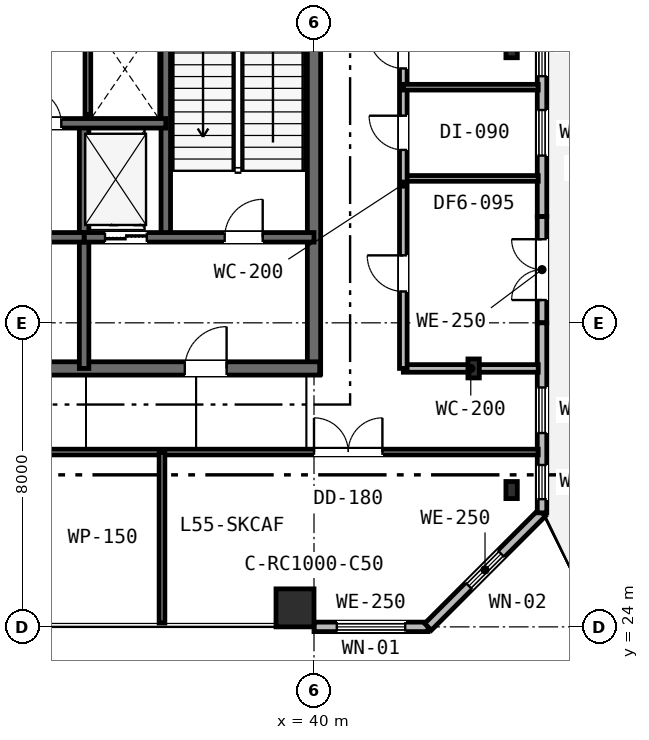
"""IFC4 building model, lengths in metres.
Left out: names, types, materials, properties, quantities, classifications, styles, units other than length and angle.
Written with IfcOpenShell. Run it as: python <this file> out.ifc"""

import sys

from ifc_helpers import new_model, si_unit, direction, frame, frame_2d, origin, origin_2d, place, context, subcontext, project, spatial, rectangle, i_section, extrude, element, fill, save


model = new_model("IFC4")
c1 = context("Model", 3, precision=1e-05, world=origin(), true_north=direction((0.0, 1.0)))
c2 = subcontext(c1, "Body", "Model", "MODEL_VIEW")
j1 = project(units=[si_unit("LENGTHUNIT", "METRE"), si_unit("PLANEANGLEUNIT", "RADIAN")], contexts=[c1])
p1 = place(None, origin())
s1 = spatial("IfcSite", under=j1, at=p1, CompositionType="ELEMENT")
p2 = place(p1, origin())
s2 = spatial("IfcBuilding", under=s1, at=p2, CompositionType="ELEMENT")
p3 = place(p2, frame((0.0, 0.0, 213.0)))
s3 = spatial("IfcBuildingStorey", under=s2, at=p3, CompositionType="ELEMENT", Elevation=213.0)
p4 = place(p3, frame((40.0, 30.65, 0.0), z_axis=(0.0, 0.0, 1.0), x_axis=(0.0, 1.0, 0.0)))
e1 = element("IfcWall", 1, at=p4, inside=s3, PredefinedType="SHEAR", context=c2, shape_type="SweptSolid", body=[
    extrude(rectangle(XDim=12.3, YDim=0.35, at=frame_2d((6.15, 0.0))), origin(), (0.0, 0.0, 1.0), 5.4),
])
p5 = place(p3, frame((28.95, 30.8, 0.0), z_axis=(0.0, 0.0, 1.0), x_axis=(1.0, 0.0, 0.0)))
e2 = element("IfcWall", 2, at=p5, inside=s3, PredefinedType="SHEAR", context=c2, shape_type="SweptSolid", body=[
    extrude(rectangle(XDim=11.2, YDim=0.35, at=frame_2d((5.6, 0.0))), origin(), (0.0, 0.0, 1.0), 5.4),
])
p6 = place(p5, frame((7.65, 0.0, 0.0)))
e3 = element("IfcOpeningElement", 3, at=p6, cuts=e2, PredefinedType="OPENING", context=c2, shape_type="SweptSolid", body=[
    extrude(rectangle(XDim=1.1, YDim=2.15, at=frame_2d((0.55, 1.075))), frame((0.0, 0.185, 0.0), z_axis=(0.0, -1.0, 0.0), x_axis=(1.0, 0.0, 0.0)), (0.0, 0.0, 1.0), 0.37),
])
p7 = place(p3, frame((36.1, 34.25, 0.0), z_axis=(0.0, 0.0, 1.0), x_axis=(0.0, 1.0, 0.0)))
e4 = element("IfcWall", 4, at=p7, inside=s3, PredefinedType="SHEAR", context=c2, shape_type="SweptSolid", body=[
    extrude(rectangle(XDim=8.65, YDim=0.25, at=frame_2d((4.325, 0.0))), origin(), (0.0, 0.0, 1.0), 5.4),
])
p8 = place(p3, frame((33.95, 30.8, 0.0), z_axis=(0.0, 0.0, 1.0), x_axis=(0.0, 1.0, 0.0)))
e5 = element("IfcWall", 5, at=p8, inside=s3, PredefinedType="SHEAR", context=c2, shape_type="SweptSolid", body=[
    extrude(rectangle(XDim=6.45, YDim=0.25, at=frame_2d((3.225, 0.0))), origin(), (0.0, 0.0, 1.0), 5.4),
])
p9 = place(p3, frame((33.95, 34.25, 0.0), z_axis=(0.0, 0.0, 1.0), x_axis=(1.0, 0.0, 0.0)))
e6 = element("IfcWall", 6, at=p9, inside=s3, PredefinedType="SHEAR", context=c2, shape_type="SweptSolid", body=[
    extrude(rectangle(XDim=6.05, YDim=0.25, at=frame_2d((3.025, 0.0))), origin(), (0.0, 0.0, 1.0), 5.4),
])
p10 = place(p9, frame((3.7, 0.0, 0.0)))
e7 = element("IfcOpeningElement", 7, at=p10, cuts=e6, PredefinedType="OPENING", context=c2, shape_type="SweptSolid", body=[
    extrude(rectangle(XDim=1.0, YDim=2.15, at=frame_2d((0.5, 1.075))), frame((0.0, 0.135, 0.0), z_axis=(0.0, -1.0, 0.0), x_axis=(1.0, 0.0, 0.0)), (0.0, 0.0, 1.0), 0.27),
])
p11 = place(p9, frame((0.55, 0.0, 0.0)))
e8 = element("IfcOpeningElement", 8, at=p11, cuts=e6, PredefinedType="OPENING", context=c2, shape_type="SweptSolid", body=[
    extrude(rectangle(XDim=1.1, YDim=2.15, at=frame_2d((0.55, 1.075))), frame((0.0, 0.135, 0.0), z_axis=(0.0, -1.0, 0.0), x_axis=(1.0, 0.0, 0.0)), (0.0, 0.0, 1.0), 0.27),
])
p12 = place(p3, frame((28.95, 34.25, 0.0), z_axis=(0.0, 0.0, 1.0), x_axis=(1.0, 0.0, 0.0)))
e9 = element("IfcWall", 9, at=p12, inside=s3, PredefinedType="SHEAR", context=c2, shape_type="SweptSolid", body=[
    extrude(rectangle(XDim=5.0, YDim=0.25, at=frame_2d((2.5, 0.0))), origin(), (0.0, 0.0, 1.0), 5.4),
])
p13 = place(p12, frame((1.95, 0.0, 0.0)))
e10 = element("IfcOpeningElement", 10, at=p13, cuts=e9, PredefinedType="OPENING", context=c2, shape_type="SweptSolid", body=[
    extrude(rectangle(XDim=1.0, YDim=2.15, at=frame_2d((0.5, 1.075))), frame((0.0, 0.135, 0.0), z_axis=(0.0, -1.0, 0.0), x_axis=(1.0, 0.0, 0.0)), (0.0, 0.0, 1.0), 0.27),
])
p14 = place(p3, frame((19.9, 37.25, 0.0), z_axis=(0.0, 0.0, 1.0), x_axis=(1.0, 0.0, 0.0)))
e11 = element("IfcWall", 11, at=p14, inside=s3, PredefinedType="SHEAR", context=c2, shape_type="SweptSolid", body=[
    extrude(rectangle(XDim=16.2, YDim=0.25, at=frame_2d((8.1, 0.0))), origin(), (0.0, 0.0, 1.0), 5.4),
])
p15 = place(p14, frame((12.55, 0.0, 0.0)))
e12 = element("IfcOpeningElement", 12, at=p15, cuts=e11, PredefinedType="OPENING", context=c2, shape_type="SweptSolid", body=[
    extrude(rectangle(XDim=0.9, YDim=2.15, at=frame_2d((0.45, 1.075))), frame((0.0, 0.135, 0.0), z_axis=(0.0, -1.0, 0.0), x_axis=(1.0, 0.0, 0.0)), (0.0, 0.0, 1.0), 0.27),
])
p16 = place(p14, frame((2.5, 0.0, 0.0)))
e13 = element("IfcOpeningElement", 13, at=p16, cuts=e11, PredefinedType="OPENING", context=c2, shape_type="SweptSolid", body=[
    extrude(rectangle(XDim=1.05, YDim=2.15, at=frame_2d((0.525, 1.075))), frame((0.0, 0.135, 0.0), z_axis=(0.0, -1.0, 0.0), x_axis=(1.0, 0.0, 0.0)), (0.0, 0.0, 1.0), 0.27),
])
p17 = place(p14, frame((4.4, 0.0, 0.0)))
e14 = element("IfcOpeningElement", 14, at=p17, cuts=e11, PredefinedType="OPENING", context=c2, shape_type="SweptSolid", body=[
    extrude(rectangle(XDim=1.05, YDim=2.15, at=frame_2d((0.525, 1.075))), frame((0.0, 0.135, 0.0), z_axis=(0.0, -1.0, 0.0), x_axis=(1.0, 0.0, 0.0)), (0.0, 0.0, 1.0), 0.27),
])
p18 = place(p14, frame((6.3, 0.0, 0.0)))
e15 = element("IfcOpeningElement", 15, at=p18, cuts=e11, PredefinedType="OPENING", context=c2, shape_type="SweptSolid", body=[
    extrude(rectangle(XDim=1.05, YDim=2.15, at=frame_2d((0.525, 1.075))), frame((0.0, 0.135, 0.0), z_axis=(0.0, -1.0, 0.0), x_axis=(1.0, 0.0, 0.0)), (0.0, 0.0, 1.0), 0.27),
])
p19 = place(p3, frame((39.5, 24.5, 0.0), z_axis=(0.0, 0.0, 1.0), x_axis=(1.0, 0.0, 0.0)))
e16 = element("IfcColumn", 16, at=p19, inside=s3, PredefinedType="COLUMN", context=c2, shape_type="SweptSolid", body=[
    extrude(rectangle(XDim=1.0, YDim=1.0, at=origin_2d()), origin(), (0.0, 0.0, 1.0), 5.4),
])
for number, where, z_axis, x_axis in (
    (17, (45.2, 27.6, 0.0), (0.0, 0.0, 1.0), (1.0, 0.0, 0.0)),
    (18, (45.2, 39.2, 0.0), (0.0, 0.0, 1.0), (1.0, 0.0, 0.0)),
):
    element("IfcColumn", number, at=place(p3, frame(where, z_axis=z_axis, x_axis=x_axis)), inside=s3, PredefinedType="COLUMN", context=c2, shape_type="SweptSolid", body=[
        extrude(i_section(OverallWidth=0.3, OverallDepth=0.45, WebThickness=0.014, FlangeThickness=0.026, FilletRadius=0.027, at=origin_2d()), origin(), (0.0, 0.0, 1.0), 5.4),
    ])
p20 = place(p3, frame((44.2, 30.8, 0.0), z_axis=(0.0, 0.0, 1.0), x_axis=(1.0, 0.0, 0.0)))
e19 = element("IfcColumn", 19, at=p20, inside=s3, PredefinedType="COLUMN", context=c2, shape_type="SweptSolid", body=[
    extrude(i_section(OverallWidth=0.3, OverallDepth=0.5, WebThickness=0.015, FlangeThickness=0.028, FilletRadius=0.027, at=origin_2d()), origin(), (0.0, 0.0, 1.0), 5.4),
])
p21 = place(p3, frame((40.0, 24.0, 0.0), z_axis=(0.0, 0.0, 1.0), x_axis=(1.0, 0.0, 0.0)))
e20 = element("IfcWall", 20, at=p21, inside=s3, PredefinedType="STANDARD", context=c2, shape_type="SweptSolid", body=[
    extrude(rectangle(XDim=3.0, YDim=0.25, at=frame_2d((1.5, 0.0))), origin(), (0.0, 0.0, 1.0), 5.13),
])
p22 = place(p21, frame((0.6, 0.0, 0.75)))
e21 = element("IfcOpeningElement", 21, at=p22, cuts=e20, PredefinedType="OPENING", context=c2, shape_type="SweptSolid", body=[
    extrude(rectangle(XDim=1.8, YDim=1.85, at=frame_2d((0.9, 0.925))), frame((0.0, 0.135, 0.0), z_axis=(0.0, -1.0, 0.0), x_axis=(1.0, 0.0, 0.0)), (0.0, 0.0, 1.0), 0.27),
])
p23 = place(p3, frame((43.0, 24.0, 0.0), z_axis=(0.0, 0.0, 1.0), x_axis=(0.707106781187, 0.707106781187, 0.0)))
e22 = element("IfcWall", 22, at=p23, inside=s3, PredefinedType="STANDARD", context=c2, shape_type="SweptSolid", body=[
    extrude(rectangle(XDim=4.243, YDim=0.25, at=frame_2d((2.121, 0.0))), origin(), (0.0, 0.0, 1.0), 5.13),
])
p24 = place(p23, frame((1.521, 0.0, 0.85)))
e23 = element("IfcOpeningElement", 23, at=p24, cuts=e22, PredefinedType="OPENING", context=c2, shape_type="SweptSolid", body=[
    extrude(rectangle(XDim=1.2, YDim=1.6, at=frame_2d((0.6, 0.8))), frame((0.0, 0.135, 0.0), z_axis=(0.0, -1.0, 0.0), x_axis=(1.0, 0.0, 0.0)), (0.0, 0.0, 1.0), 0.27),
])
p25 = place(p3, frame((46.0, 32.0, 0.0), z_axis=(0.0, 0.0, 1.0), x_axis=(0.0, 1.0, 0.0)))
e24 = element("IfcWall", 24, at=p25, inside=s3, PredefinedType="STANDARD", context=c2, shape_type="SweptSolid", body=[
    extrude(rectangle(XDim=2.8, YDim=0.25, at=frame_2d((1.4, 0.0))), origin(), (0.0, 0.0, 1.0), 5.13),
])
p26 = place(p25, frame((0.6, 0.0, 0.0)))
e25 = element("IfcOpeningElement", 25, at=p26, cuts=e24, PredefinedType="OPENING", context=c2, shape_type="SweptSolid", body=[
    extrude(rectangle(XDim=1.6, YDim=2.2, at=frame_2d((0.8, 1.1))), frame((0.0, 0.135, 0.0), z_axis=(0.0, -1.0, 0.0), x_axis=(1.0, 0.0, 0.0)), (0.0, 0.0, 1.0), 0.27),
])
p27 = place(p3, frame((46.0, 27.0, 0.0), z_axis=(0.0, 0.0, 1.0), x_axis=(0.0, 1.0, 0.0)))
e26 = element("IfcWall", 26, at=p27, inside=s3, PredefinedType="STANDARD", context=c2, shape_type="SweptSolid", body=[
    extrude(rectangle(XDim=5.0, YDim=0.25, at=frame_2d((2.5, 0.0))), origin(), (0.0, 0.0, 1.0), 5.13),
])
p28 = place(p27, frame((0.36, 0.0, 0.9)))
e27 = element("IfcOpeningElement", 27, at=p28, cuts=e26, PredefinedType="OPENING", context=c2, shape_type="SweptSolid", body=[
    extrude(rectangle(XDim=0.9, YDim=1.55, at=frame_2d((0.45, 0.775))), frame((0.0, 0.135, 0.0), z_axis=(0.0, -1.0, 0.0), x_axis=(1.0, 0.0, 0.0)), (0.0, 0.0, 1.0), 0.27),
])
p29 = place(p27, frame((2.1, 0.0, 0.85)))
e28 = element("IfcOpeningElement", 28, at=p29, cuts=e26, PredefinedType="OPENING", context=c2, shape_type="SweptSolid", body=[
    extrude(rectangle(XDim=1.2, YDim=1.6, at=frame_2d((0.6, 0.8))), frame((0.0, 0.135, 0.0), z_axis=(0.0, -1.0, 0.0), x_axis=(1.0, 0.0, 0.0)), (0.0, 0.0, 1.0), 0.27),
])
p30 = place(p3, frame((46.0, 34.8, 0.0), z_axis=(0.0, 0.0, 1.0), x_axis=(0.0, 1.0, 0.0)))
e29 = element("IfcWall", 29, at=p30, inside=s3, PredefinedType="STANDARD", context=c2, shape_type="SweptSolid", body=[
    extrude(rectangle(XDim=5.2, YDim=0.25, at=frame_2d((2.6, 0.0))), origin(), (0.0, 0.0, 1.0), 5.13),
])
p31 = place(p30, frame((1.6, 0.0, 0.85)))
e30 = element("IfcOpeningElement", 30, at=p31, cuts=e29, PredefinedType="OPENING", context=c2, shape_type="SweptSolid", body=[
    extrude(rectangle(XDim=1.2, YDim=1.6, at=frame_2d((0.6, 0.8))), frame((0.0, 0.135, 0.0), z_axis=(0.0, -1.0, 0.0), x_axis=(1.0, 0.0, 0.0)), (0.0, 0.0, 1.0), 0.27),
])
p32 = place(p30, frame((3.69, 0.0, 0.85)))
e31 = element("IfcOpeningElement", 31, at=p32, cuts=e29, PredefinedType="OPENING", context=c2, shape_type="SweptSolid", body=[
    extrude(rectangle(XDim=1.2, YDim=1.6, at=frame_2d((0.6, 0.8))), frame((0.0, 0.135, 0.0), z_axis=(0.0, -1.0, 0.0), x_axis=(1.0, 0.0, 0.0)), (0.0, 0.0, 1.0), 0.27),
])
p33 = place(p3, frame((34.05, 37.473, 0.0), z_axis=(0.0, 0.0, 1.0), x_axis=(0.0, 1.0, 0.0)))
e32 = element("IfcWall", 32, at=p33, inside=s3, PredefinedType="PLUMBINGWALL", context=c2, shape_type="SweptSolid", body=[
    extrude(rectangle(XDim=2.577, YDim=0.15, at=frame_2d((1.288, 0.0))), origin(), (0.0, 0.0, 1.0), 5.13),
])
p34 = place(p3, frame((42.35, 30.8, 0.0), z_axis=(0.0, 0.0, 1.0), x_axis=(1.0, 0.0, 0.0)))
e33 = element("IfcWall", 33, at=p34, inside=s3, PredefinedType="PARTITIONING", context=c2, shape_type="SweptSolid", body=[
    extrude(rectangle(XDim=3.55, YDim=0.2, at=frame_2d((1.775, 0.0))), origin(), (0.0, 0.0, 1.0), 4.52),
])
p35 = place(p3, frame((42.35, 35.8, 0.0), z_axis=(0.0, 0.0, 1.0), x_axis=(1.0, 0.0, 0.0)))
e34 = element("IfcWall", 34, at=p35, inside=s3, PredefinedType="PARTITIONING", context=c2, shape_type="SweptSolid", body=[
    extrude(rectangle(XDim=3.55, YDim=0.15, at=frame_2d((1.775, 0.0))), origin(), (0.0, 0.0, 1.0), 4.52),
])
p36 = place(p3, frame((42.35, 30.8, 0.0), z_axis=(0.0, 0.0, 1.0), x_axis=(0.0, 1.0, 0.0)))
e35 = element("IfcWall", 35, at=p36, inside=s3, PredefinedType="PARTITIONING", context=c2, shape_type="SweptSolid", body=[
    extrude(rectangle(XDim=9.7, YDim=0.2, at=frame_2d((4.85, 0.0))), origin(), (0.0, 0.0, 1.0), 4.52),
])
p37 = place(p36, frame((2.025, 0.0, 0.0)))
e36 = element("IfcOpeningElement", 36, at=p37, cuts=e35, PredefinedType="OPENING", context=c2, shape_type="SweptSolid", body=[
    extrude(rectangle(XDim=0.95, YDim=2.15, at=frame_2d((0.475, 1.075))), frame((0.0, 0.11, 0.0), z_axis=(0.0, -1.0, 0.0), x_axis=(1.0, 0.0, 0.0)), (0.0, 0.0, 1.0), 0.22),
])
p38 = place(p36, frame((5.75, 0.0, 0.0)))
e37 = element("IfcOpeningElement", 37, at=p38, cuts=e35, PredefinedType="OPENING", context=c2, shape_type="SweptSolid", body=[
    extrude(rectangle(XDim=0.9, YDim=2.15, at=frame_2d((0.45, 1.075))), frame((0.0, 0.11, 0.0), z_axis=(0.0, -1.0, 0.0), x_axis=(1.0, 0.0, 0.0)), (0.0, 0.0, 1.0), 0.22),
])
p39 = place(p36, frame((7.893, 0.0, 0.0)))
e38 = element("IfcOpeningElement", 38, at=p39, cuts=e35, PredefinedType="OPENING", context=c2, shape_type="SweptSolid", body=[
    extrude(rectangle(XDim=0.9, YDim=2.15, at=frame_2d((0.45, 1.075))), frame((0.0, 0.11, 0.0), z_axis=(0.0, -1.0, 0.0), x_axis=(1.0, 0.0, 0.0)), (0.0, 0.0, 1.0), 0.22),
])
p40 = place(p3, frame((42.35, 38.2, 0.0), z_axis=(0.0, 0.0, 1.0), x_axis=(1.0, 0.0, 0.0)))
e39 = element("IfcWall", 39, at=p40, inside=s3, PredefinedType="PARTITIONING", context=c2, shape_type="SweptSolid", body=[
    extrude(rectangle(XDim=3.55, YDim=0.15, at=frame_2d((1.775, 0.0))), origin(), (0.0, 0.0, 1.0), 4.52),
])
p41 = place(p3, frame((13.7, 28.6, 0.0), z_axis=(0.0, 0.0, 1.0), x_axis=(1.0, 0.0, 0.0)))
e40 = element("IfcWall", 40, at=p41, inside=s3, PredefinedType="PARTITIONING", context=c2, shape_type="SweptSolid", body=[
    extrude(rectangle(XDim=32.2, YDim=0.15, at=frame_2d((16.1, 0.0))), origin(), (0.0, 0.0, 1.0), 4.52),
])
p42 = place(p41, frame((15.4, 0.0, 0.0)))
e41 = element("IfcOpeningElement", 41, at=p42, cuts=e40, PredefinedType="OPENING", context=c2, shape_type="SweptSolid", body=[
    extrude(rectangle(XDim=1.8, YDim=2.15, at=frame_2d((0.9, 1.075))), frame((0.0, 0.085, 0.0), z_axis=(0.0, -1.0, 0.0), x_axis=(1.0, 0.0, 0.0)), (0.0, 0.0, 1.0), 0.17),
])
p43 = place(p41, frame((26.3, 0.0, 0.0)))
e42 = element("IfcOpeningElement", 42, at=p43, cuts=e40, PredefinedType="OPENING", context=c2, shape_type="SweptSolid", body=[
    extrude(rectangle(XDim=1.8, YDim=2.15, at=frame_2d((0.9, 1.075))), frame((0.0, 0.085, 0.0), z_axis=(0.0, -1.0, 0.0), x_axis=(1.0, 0.0, 0.0)), (0.0, 0.0, 1.0), 0.17),
])
p44 = place(p3, frame((36.0, 24.1, 0.0), z_axis=(0.0, 0.0, 1.0), x_axis=(0.0, 1.0, 0.0)))
e43 = element("IfcWall", 43, at=p44, inside=s3, PredefinedType="PARTITIONING", context=c2, shape_type="SweptSolid", body=[
    extrude(rectangle(XDim=4.5, YDim=0.15, at=frame_2d((2.25, 0.0))), origin(), (0.0, 0.0, 1.0), 4.84),
])
p45 = place(p22, origin())
e44 = element("IfcWindow", 44, at=p45, inside=s3, PartitioningType="SINGLE_PANEL", PredefinedType="WINDOW", context=c2, shape_type="SweptSolid", body=[
    extrude(rectangle(XDim=1.8, YDim=1.85, at=frame_2d((0.9, 0.925))), frame((0.0, 0.03, 0.0), z_axis=(0.0, -1.0, 0.0), x_axis=(1.0, 0.0, 0.0)), (0.0, 0.0, 1.0), 0.06),
])
fill(e21, e44)
p46 = place(p24, origin())
e45 = element("IfcWindow", 45, at=p46, inside=s3, PartitioningType="SINGLE_PANEL", PredefinedType="WINDOW", context=c2, shape_type="SweptSolid", body=[
    extrude(rectangle(XDim=1.2, YDim=1.6, at=frame_2d((0.6, 0.8))), frame((0.0, 0.03, 0.0), z_axis=(0.0, -1.0, 0.0), x_axis=(1.0, 0.0, 0.0)), (0.0, 0.0, 1.0), 0.06),
])
fill(e23, e45)
p47 = place(p26, origin())
e46 = element("IfcDoor", 46, at=p47, inside=s3, OperationType="DOUBLE_DOOR_SINGLE_SWING", PredefinedType="DOOR", context=c2, shape_type="SweptSolid", body=[
    extrude(rectangle(XDim=1.6, YDim=2.2, at=frame_2d((0.8, 1.1))), frame((0.0, 0.025, 0.0), z_axis=(0.0, -1.0, 0.0), x_axis=(1.0, 0.0, 0.0)), (0.0, 0.0, 1.0), 0.05),
])
fill(e25, e46)
p48 = place(p28, origin())
e47 = element("IfcWindow", 47, at=p48, inside=s3, PartitioningType="SINGLE_PANEL", PredefinedType="WINDOW", context=c2, shape_type="SweptSolid", body=[
    extrude(rectangle(XDim=0.9, YDim=1.55, at=frame_2d((0.45, 0.775))), frame((0.0, 0.03, 0.0), z_axis=(0.0, -1.0, 0.0), x_axis=(1.0, 0.0, 0.0)), (0.0, 0.0, 1.0), 0.06),
])
fill(e27, e47)
p49 = place(p29, origin())
e48 = element("IfcWindow", 48, at=p49, inside=s3, PartitioningType="SINGLE_PANEL", PredefinedType="WINDOW", context=c2, shape_type="SweptSolid", body=[
    extrude(rectangle(XDim=1.2, YDim=1.6, at=frame_2d((0.6, 0.8))), frame((0.0, 0.03, 0.0), z_axis=(0.0, -1.0, 0.0), x_axis=(1.0, 0.0, 0.0)), (0.0, 0.0, 1.0), 0.06),
])
fill(e28, e48)
p50 = place(p31, origin())
e49 = element("IfcWindow", 49, at=p50, inside=s3, PartitioningType="SINGLE_PANEL", PredefinedType="WINDOW", context=c2, shape_type="SweptSolid", body=[
    extrude(rectangle(XDim=1.2, YDim=1.6, at=frame_2d((0.6, 0.8))), frame((0.0, 0.03, 0.0), z_axis=(0.0, -1.0, 0.0), x_axis=(1.0, 0.0, 0.0)), (0.0, 0.0, 1.0), 0.06),
])
fill(e30, e49)
p51 = place(p32, origin())
e50 = element("IfcWindow", 50, at=p51, inside=s3, PartitioningType="SINGLE_PANEL", PredefinedType="WINDOW", context=c2, shape_type="SweptSolid", body=[
    extrude(rectangle(XDim=1.2, YDim=1.6, at=frame_2d((0.6, 0.8))), frame((0.0, 0.03, 0.0), z_axis=(0.0, -1.0, 0.0), x_axis=(1.0, 0.0, 0.0)), (0.0, 0.0, 1.0), 0.06),
])
fill(e31, e50)
p52 = place(p10, origin())
e51 = element("IfcDoor", 51, at=p52, inside=s3, OperationType="SINGLE_SWING_RIGHT", PredefinedType="DOOR", context=c2, shape_type="SweptSolid", body=[
    extrude(rectangle(XDim=1.0, YDim=2.15, at=frame_2d((0.5, 1.075))), frame((0.0, 0.025, 0.0), z_axis=(0.0, -1.0, 0.0), x_axis=(1.0, 0.0, 0.0)), (0.0, 0.0, 1.0), 0.05),
])
fill(e7, e51)
p53 = place(p6, origin())
e52 = element("IfcDoor", 52, at=p53, inside=s3, OperationType="SINGLE_SWING_RIGHT", PredefinedType="DOOR", context=c2, shape_type="SweptSolid", body=[
    extrude(rectangle(XDim=1.1, YDim=2.15, at=frame_2d((0.55, 1.075))), frame((0.0, 0.025, 0.0), z_axis=(0.0, -1.0, 0.0), x_axis=(1.0, 0.0, 0.0)), (0.0, 0.0, 1.0), 0.05),
])
fill(e3, e52)
p54 = place(p15, origin())
e53 = element("IfcDoor", 53, at=p54, inside=s3, OperationType="SINGLE_SWING_LEFT", PredefinedType="DOOR", context=c2, shape_type="SweptSolid", body=[
    extrude(rectangle(XDim=0.9, YDim=2.15, at=frame_2d((0.45, 1.075))), frame((0.0, 0.025, 0.0), z_axis=(0.0, -1.0, 0.0), x_axis=(1.0, 0.0, 0.0)), (0.0, 0.0, 1.0), 0.05),
])
fill(e12, e53)
p55 = place(p37, origin())
e54 = element("IfcDoor", 54, at=p55, inside=s3, OperationType="SINGLE_SWING_RIGHT", PredefinedType="DOOR", context=c2, shape_type="SweptSolid", body=[
    extrude(rectangle(XDim=0.95, YDim=2.15, at=frame_2d((0.475, 1.075))), frame((0.0, 0.025, 0.0), z_axis=(0.0, -1.0, 0.0), x_axis=(1.0, 0.0, 0.0)), (0.0, 0.0, 1.0), 0.05),
])
fill(e36, e54)
p56 = place(p38, origin())
e55 = element("IfcDoor", 55, at=p56, inside=s3, OperationType="SINGLE_SWING_RIGHT", PredefinedType="DOOR", context=c2, shape_type="SweptSolid", body=[
    extrude(rectangle(XDim=0.9, YDim=2.15, at=frame_2d((0.45, 1.075))), frame((0.0, 0.025, 0.0), z_axis=(0.0, -1.0, 0.0), x_axis=(1.0, 0.0, 0.0)), (0.0, 0.0, 1.0), 0.05),
])
fill(e37, e55)
p57 = place(p39, origin())
e56 = element("IfcDoor", 56, at=p57, inside=s3, OperationType="SINGLE_SWING_RIGHT", PredefinedType="DOOR", context=c2, shape_type="SweptSolid", body=[
    extrude(rectangle(XDim=0.9, YDim=2.15, at=frame_2d((0.45, 1.075))), frame((0.0, 0.025, 0.0), z_axis=(0.0, -1.0, 0.0), x_axis=(1.0, 0.0, 0.0)), (0.0, 0.0, 1.0), 0.05),
])
fill(e38, e56)
p58 = place(p43, origin())
e57 = element("IfcDoor", 57, at=p58, inside=s3, OperationType="DOUBLE_DOOR_SINGLE_SWING", PredefinedType="DOOR", context=c2, shape_type="SweptSolid", body=[
    extrude(rectangle(XDim=1.8, YDim=2.15, at=frame_2d((0.9, 1.075))), frame((0.0, 0.025, 0.0), z_axis=(0.0, -1.0, 0.0), x_axis=(1.0, 0.0, 0.0)), (0.0, 0.0, 1.0), 0.05),
])
fill(e42, e57)
p59 = place(p11, origin())
e58 = element("IfcDoor", 58, at=p59, inside=s3, OperationType="DOUBLE_DOOR_SLIDING", PredefinedType="DOOR", context=c2, shape_type="SweptSolid", body=[
    extrude(rectangle(XDim=1.1, YDim=2.15, at=frame_2d((0.55, 1.075))), frame((0.0, 0.025, 0.0), z_axis=(0.0, -1.0, 0.0), x_axis=(1.0, 0.0, 0.0)), (0.0, 0.0, 1.0), 0.05),
])
fill(e8, e58)
save(model, sys.argv[1])
